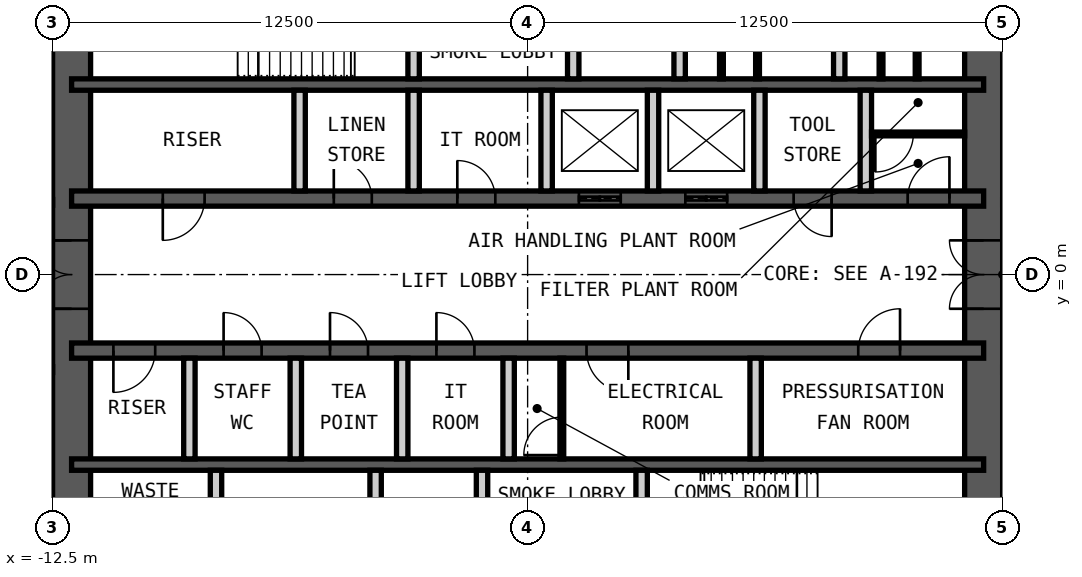
"""IFC4 building model, lengths in metres.
Left out: names, types, materials, properties, quantities, classifications, styles, units other than length and angle.
Written with IfcOpenShell. Run it as: python <this file> out.ifc"""

import sys

from ifc_helpers import new_model, si_unit, direction, frame, frame_2d, origin, place, context, subcontext, project, spatial, rectangle, extrude, element, fill, save


model = new_model("IFC4")
c1 = context("Model", 3, precision=1e-05, world=origin(), true_north=direction((0.0, 1.0)))
c2 = subcontext(c1, "Body", "Model", "MODEL_VIEW")
j1 = project(units=[si_unit("LENGTHUNIT", "METRE"), si_unit("PLANEANGLEUNIT", "RADIAN")], contexts=[c1])
p1 = place(None, origin())
s1 = spatial("IfcSite", under=j1, at=p1, CompositionType="ELEMENT")
p2 = place(p1, origin())
s2 = spatial("IfcBuilding", under=s1, at=p2, CompositionType="ELEMENT")
p3 = place(p2, frame((0.0, 0.0, 274.6)))
s3 = spatial("IfcBuildingStorey", under=s2, at=p3, CompositionType="ELEMENT", Elevation=274.6)
p4 = place(p3, frame((12.0, -9.0, 0.0), z_axis=(0.0, 0.0, 1.0), x_axis=(0.0, 1.0, 0.0)))
e1 = element("IfcWall", 1, at=p4, inside=s3, PredefinedType="SHEAR", context=c2, shape_type="SweptSolid", body=[
    extrude(rectangle(XDim=18.0, YDim=1.0, at=frame_2d((9.0, 0.0))), origin(), (0.0, 0.0, 1.0), 4.2),
])
p5 = place(p4, frame((8.1, 0.0, 0.0)))
e2 = element("IfcOpeningElement", 2, at=p5, cuts=e1, PredefinedType="OPENING", context=c2, shape_type="SweptSolid", body=[
    extrude(rectangle(XDim=1.8, YDim=2.1, at=frame_2d((0.9, 1.05))), frame((0.0, 0.51, 0.0), z_axis=(0.0, -1.0, 0.0), x_axis=(1.0, 0.0, 0.0)), (0.0, 0.0, 1.0), 1.02),
])
p6 = place(p3, frame((-12.0, -9.0, 0.0), z_axis=(0.0, 0.0, 1.0), x_axis=(0.0, 1.0, 0.0)))
e3 = element("IfcWall", 3, at=p6, inside=s3, PredefinedType="SHEAR", context=c2, shape_type="SweptSolid", body=[
    extrude(rectangle(XDim=18.0, YDim=1.0, at=frame_2d((9.0, 0.0))), origin(), (0.0, 0.0, 1.0), 4.2),
])
p7 = place(p6, frame((8.1, 0.0, 0.0)))
e4 = element("IfcOpeningElement", 4, at=p7, cuts=e3, PredefinedType="OPENING", context=c2, shape_type="SweptSolid", body=[
    extrude(rectangle(XDim=1.8, YDim=2.1, at=frame_2d((0.9, 1.05))), frame((0.0, 0.51, 0.0), z_axis=(0.0, -1.0, 0.0), x_axis=(1.0, 0.0, 0.0)), (0.0, 0.0, 1.0), 1.02),
])
p8 = place(p3, frame((-12.0, 5.0, 0.0), z_axis=(0.0, 0.0, 1.0), x_axis=(1.0, 0.0, 0.0)))
e5 = element("IfcWall", 5, at=p8, inside=s3, PredefinedType="SHEAR", context=c2, shape_type="SweptSolid", body=[
    extrude(rectangle(XDim=24.0, YDim=0.3, at=frame_2d((12.0, 0.0))), origin(), (0.0, 0.0, 1.0), 4.2),
])
p9 = place(p3, frame((-12.0, 2.0, 0.0), z_axis=(0.0, 0.0, 1.0), x_axis=(1.0, 0.0, 0.0)))
e6 = element("IfcWall", 6, at=p9, inside=s3, PredefinedType="SHEAR", context=c2, shape_type="SweptSolid", body=[
    extrude(rectangle(XDim=24.0, YDim=0.4, at=frame_2d((12.0, 0.0))), origin(), (0.0, 0.0, 1.0), 4.2),
])
p10 = place(p9, frame((2.4, 0.0, 0.0)))
e7 = element("IfcOpeningElement", 7, at=p10, cuts=e6, PredefinedType="OPENING", context=c2, shape_type="SweptSolid", body=[
    extrude(rectangle(XDim=1.1, YDim=2.1, at=frame_2d((0.55, 1.05))), frame((0.0, 0.21, 0.0), z_axis=(0.0, -1.0, 0.0), x_axis=(1.0, 0.0, 0.0)), (0.0, 0.0, 1.0), 0.42),
])
p11 = place(p9, frame((22.0, 0.0, 0.0)))
e8 = element("IfcOpeningElement", 8, at=p11, cuts=e6, PredefinedType="OPENING", context=c2, shape_type="SweptSolid", body=[
    extrude(rectangle(XDim=1.1, YDim=2.1, at=frame_2d((0.55, 1.05))), frame((0.0, 0.21, 0.0), z_axis=(0.0, -1.0, 0.0), x_axis=(1.0, 0.0, 0.0)), (0.0, 0.0, 1.0), 0.42),
])
p12 = place(p9, frame((10.15, 0.0, 0.0)))
e9 = element("IfcOpeningElement", 9, at=p12, cuts=e6, PredefinedType="OPENING", context=c2, shape_type="SweptSolid", body=[
    extrude(rectangle(XDim=1.0, YDim=2.1, at=frame_2d((0.5, 1.05))), frame((0.0, 0.21, 0.0), z_axis=(0.0, -1.0, 0.0), x_axis=(1.0, 0.0, 0.0)), (0.0, 0.0, 1.0), 0.42),
])
p13 = place(p9, frame((6.9, 0.0, 0.0)))
e10 = element("IfcOpeningElement", 10, at=p13, cuts=e6, PredefinedType="OPENING", context=c2, shape_type="SweptSolid", body=[
    extrude(rectangle(XDim=1.0, YDim=2.1, at=frame_2d((0.5, 1.05))), frame((0.0, 0.21, 0.0), z_axis=(0.0, -1.0, 0.0), x_axis=(1.0, 0.0, 0.0)), (0.0, 0.0, 1.0), 0.42),
])
p14 = place(p9, frame((13.35, 0.0, 0.0)))
e11 = element("IfcOpeningElement", 11, at=p14, cuts=e6, PredefinedType="OPENING", context=c2, shape_type="SweptSolid", body=[
    extrude(rectangle(XDim=1.1, YDim=2.4, at=frame_2d((0.55, 1.2))), frame((0.0, 0.21, 0.0), z_axis=(0.0, -1.0, 0.0), x_axis=(1.0, 0.0, 0.0)), (0.0, 0.0, 1.0), 0.42),
])
p15 = place(p9, frame((16.15, 0.0, 0.0)))
e12 = element("IfcOpeningElement", 12, at=p15, cuts=e6, PredefinedType="OPENING", context=c2, shape_type="SweptSolid", body=[
    extrude(rectangle(XDim=1.1, YDim=2.4, at=frame_2d((0.55, 1.2))), frame((0.0, 0.21, 0.0), z_axis=(0.0, -1.0, 0.0), x_axis=(1.0, 0.0, 0.0)), (0.0, 0.0, 1.0), 0.42),
])
p16 = place(p9, frame((19.0, 0.0, 0.0)))
e13 = element("IfcOpeningElement", 13, at=p16, cuts=e6, PredefinedType="OPENING", context=c2, shape_type="SweptSolid", body=[
    extrude(rectangle(XDim=1.0, YDim=2.1, at=frame_2d((0.5, 1.05))), frame((0.0, 0.21, 0.0), z_axis=(0.0, -1.0, 0.0), x_axis=(1.0, 0.0, 0.0)), (0.0, 0.0, 1.0), 0.42),
])
p17 = place(p3, frame((-12.0, -2.0, 0.0), z_axis=(0.0, 0.0, 1.0), x_axis=(1.0, 0.0, 0.0)))
e14 = element("IfcWall", 14, at=p17, inside=s3, PredefinedType="SHEAR", context=c2, shape_type="SweptSolid", body=[
    extrude(rectangle(XDim=24.0, YDim=0.4, at=frame_2d((12.0, 0.0))), origin(), (0.0, 0.0, 1.0), 4.2),
])
p18 = place(p17, frame((1.1, 0.0, 0.0)))
e15 = element("IfcOpeningElement", 15, at=p18, cuts=e14, PredefinedType="OPENING", context=c2, shape_type="SweptSolid", body=[
    extrude(rectangle(XDim=1.1, YDim=2.1, at=frame_2d((0.55, 1.05))), frame((0.0, 0.21, 0.0), z_axis=(0.0, -1.0, 0.0), x_axis=(1.0, 0.0, 0.0)), (0.0, 0.0, 1.0), 0.42),
])
p19 = place(p17, frame((13.55, 0.0, 0.0)))
e16 = element("IfcOpeningElement", 16, at=p19, cuts=e14, PredefinedType="OPENING", context=c2, shape_type="SweptSolid", body=[
    extrude(rectangle(XDim=1.1, YDim=2.1, at=frame_2d((0.55, 1.05))), frame((0.0, 0.21, 0.0), z_axis=(0.0, -1.0, 0.0), x_axis=(1.0, 0.0, 0.0)), (0.0, 0.0, 1.0), 0.42),
])
p20 = place(p17, frame((20.7, 0.0, 0.0)))
e17 = element("IfcOpeningElement", 17, at=p20, cuts=e14, PredefinedType="OPENING", context=c2, shape_type="SweptSolid", body=[
    extrude(rectangle(XDim=1.1, YDim=2.1, at=frame_2d((0.55, 1.05))), frame((0.0, 0.21, 0.0), z_axis=(0.0, -1.0, 0.0), x_axis=(1.0, 0.0, 0.0)), (0.0, 0.0, 1.0), 0.42),
])
p21 = place(p17, frame((4.0, 0.0, 0.0)))
e18 = element("IfcOpeningElement", 18, at=p21, cuts=e14, PredefinedType="OPENING", context=c2, shape_type="SweptSolid", body=[
    extrude(rectangle(XDim=1.0, YDim=2.1, at=frame_2d((0.5, 1.05))), frame((0.0, 0.21, 0.0), z_axis=(0.0, -1.0, 0.0), x_axis=(1.0, 0.0, 0.0)), (0.0, 0.0, 1.0), 0.42),
])
p22 = place(p17, frame((6.8, 0.0, 0.0)))
e19 = element("IfcOpeningElement", 19, at=p22, cuts=e14, PredefinedType="OPENING", context=c2, shape_type="SweptSolid", body=[
    extrude(rectangle(XDim=1.0, YDim=2.1, at=frame_2d((0.5, 1.05))), frame((0.0, 0.21, 0.0), z_axis=(0.0, -1.0, 0.0), x_axis=(1.0, 0.0, 0.0)), (0.0, 0.0, 1.0), 0.42),
])
p23 = place(p17, frame((9.6, 0.0, 0.0)))
e20 = element("IfcOpeningElement", 20, at=p23, cuts=e14, PredefinedType="OPENING", context=c2, shape_type="SweptSolid", body=[
    extrude(rectangle(XDim=1.0, YDim=2.1, at=frame_2d((0.5, 1.05))), frame((0.0, 0.21, 0.0), z_axis=(0.0, -1.0, 0.0), x_axis=(1.0, 0.0, 0.0)), (0.0, 0.0, 1.0), 0.42),
])
p24 = place(p3, frame((-12.0, -5.0, 0.0), z_axis=(0.0, 0.0, 1.0), x_axis=(1.0, 0.0, 0.0)))
e21 = element("IfcWall", 21, at=p24, inside=s3, PredefinedType="SHEAR", context=c2, shape_type="SweptSolid", body=[
    extrude(rectangle(XDim=24.0, YDim=0.3, at=frame_2d((12.0, 0.0))), origin(), (0.0, 0.0, 1.0), 4.2),
])
p25 = place(p3, frame((-3.0, 5.15, 0.0), z_axis=(0.0, 0.0, 1.0), x_axis=(0.0, 1.0, 0.0)))
e22 = element("IfcWall", 22, at=p25, inside=s3, PredefinedType="PARTITIONING", context=c2, shape_type="SweptSolid", body=[
    extrude(rectangle(XDim=3.85, YDim=0.3, at=frame_2d((1.925, 0.0))), origin(), (0.0, 0.0, 1.0), 3.98),
])
p26 = place(p25, frame((1.425, 0.0, 0.0)))
e23 = element("IfcOpeningElement", 23, at=p26, cuts=e22, PredefinedType="OPENING", context=c2, shape_type="SweptSolid", body=[
    extrude(rectangle(XDim=1.0, YDim=2.1, at=frame_2d((0.5, 1.05))), frame((0.0, 0.16, 0.0), z_axis=(0.0, -1.0, 0.0), x_axis=(1.0, 0.0, 0.0)), (0.0, 0.0, 1.0), 0.32),
])
p27 = place(p3, frame((1.2, 5.15, 0.0), z_axis=(0.0, 0.0, 1.0), x_axis=(0.0, 1.0, 0.0)))
e24 = element("IfcWall", 24, at=p27, inside=s3, PredefinedType="PARTITIONING", context=c2, shape_type="SweptSolid", body=[
    extrude(rectangle(XDim=3.85, YDim=0.3, at=frame_2d((1.925, 0.0))), origin(), (0.0, 0.0, 1.0), 3.98),
])
p28 = place(p27, frame((1.375, 0.0, 0.0)))
e25 = element("IfcOpeningElement", 25, at=p28, cuts=e24, PredefinedType="OPENING", context=c2, shape_type="SweptSolid", body=[
    extrude(rectangle(XDim=1.1, YDim=2.4, at=frame_2d((0.55, 1.2))), frame((0.0, 0.16, 0.0), z_axis=(0.0, -1.0, 0.0), x_axis=(1.0, 0.0, 0.0)), (0.0, 0.0, 1.0), 0.32),
])
for number, where, z_axis, x_axis in (
    (26, (4.0, 5.15, 0.0), (0.0, 0.0, 1.0), (0.0, 1.0, 0.0)),
    (27, (8.2, 5.15, 0.0), (0.0, 0.0, 1.0), (0.0, 1.0, 0.0)),
):
    element("IfcWall", number, at=place(p3, frame(where, z_axis=z_axis, x_axis=x_axis)), inside=s3, PredefinedType="PARTITIONING", context=c2, shape_type="SweptSolid", body=[
        extrude(rectangle(XDim=3.85, YDim=0.3, at=frame_2d((1.925, 0.0))), origin(), (0.0, 0.0, 1.0), 3.98),
    ])
for number, where, z_axis, x_axis in (
    (28, (-6.0, 2.2, 0.0), (0.0, 0.0, 1.0), (0.0, 1.0, 0.0)),
    (29, (-3.0, 2.2, 0.0), (0.0, 0.0, 1.0), (0.0, 1.0, 0.0)),
    (30, (0.5, 2.2, 0.0), (0.0, 0.0, 1.0), (0.0, 1.0, 0.0)),
    (31, (3.3, 2.2, 0.0), (0.0, 0.0, 1.0), (0.0, 1.0, 0.0)),
    (32, (6.1, 2.2, 0.0), (0.0, 0.0, 1.0), (0.0, 1.0, 0.0)),
    (33, (8.9, 2.2, 0.0), (0.0, 0.0, 1.0), (0.0, 1.0, 0.0)),
    (34, (-8.9, -4.85, 0.0), (0.0, 0.0, 1.0), (0.0, 1.0, 0.0)),
    (35, (-6.1, -4.85, 0.0), (0.0, 0.0, 1.0), (0.0, 1.0, 0.0)),
    (36, (-3.3, -4.85, 0.0), (0.0, 0.0, 1.0), (0.0, 1.0, 0.0)),
    (37, (-0.5, -4.85, 0.0), (0.0, 0.0, 1.0), (0.0, 1.0, 0.0)),
    (38, (6.0, -4.85, 0.0), (0.0, 0.0, 1.0), (0.0, 1.0, 0.0)),
):
    element("IfcWall", number, at=place(p3, frame(where, z_axis=z_axis, x_axis=x_axis)), inside=s3, PredefinedType="PARTITIONING", context=c2, shape_type="SweptSolid", body=[
        extrude(rectangle(XDim=2.65, YDim=0.3, at=frame_2d((1.325, 0.0))), origin(), (0.0, 0.0, 1.0), 3.98),
    ])
for number, where, z_axis, x_axis in (
    (39, (-8.2, -9.0, 0.0), (0.0, 0.0, 1.0), (0.0, 1.0, 0.0)),
    (40, (-4.0, -9.0, 0.0), (0.0, 0.0, 1.0), (0.0, 1.0, 0.0)),
):
    element("IfcWall", number, at=place(p3, frame(where, z_axis=z_axis, x_axis=x_axis)), inside=s3, PredefinedType="PARTITIONING", context=c2, shape_type="SweptSolid", body=[
        extrude(rectangle(XDim=3.85, YDim=0.3, at=frame_2d((1.925, 0.0))), origin(), (0.0, 0.0, 1.0), 3.98),
    ])
p29 = place(p3, frame((-1.2, -9.0, 0.0), z_axis=(0.0, 0.0, 1.0), x_axis=(0.0, 1.0, 0.0)))
e41 = element("IfcWall", 41, at=p29, inside=s3, PredefinedType="PARTITIONING", context=c2, shape_type="SweptSolid", body=[
    extrude(rectangle(XDim=3.85, YDim=0.3, at=frame_2d((1.925, 0.0))), origin(), (0.0, 0.0, 1.0), 3.98),
])
p30 = place(p29, frame((1.375, 0.0, 0.0)))
e42 = element("IfcOpeningElement", 42, at=p30, cuts=e41, PredefinedType="OPENING", context=c2, shape_type="SweptSolid", body=[
    extrude(rectangle(XDim=1.1, YDim=2.4, at=frame_2d((0.55, 1.2))), frame((0.0, 0.16, 0.0), z_axis=(0.0, -1.0, 0.0), x_axis=(1.0, 0.0, 0.0)), (0.0, 0.0, 1.0), 0.32),
])
p31 = place(p3, frame((3.0, -9.0, 0.0), z_axis=(0.0, 0.0, 1.0), x_axis=(0.0, 1.0, 0.0)))
e43 = element("IfcWall", 43, at=p31, inside=s3, PredefinedType="PARTITIONING", context=c2, shape_type="SweptSolid", body=[
    extrude(rectangle(XDim=3.85, YDim=0.3, at=frame_2d((1.925, 0.0))), origin(), (0.0, 0.0, 1.0), 3.98),
])
p32 = place(p31, frame((1.425, 0.0, 0.0)))
e44 = element("IfcOpeningElement", 44, at=p32, cuts=e43, PredefinedType="OPENING", context=c2, shape_type="SweptSolid", body=[
    extrude(rectangle(XDim=1.0, YDim=2.1, at=frame_2d((0.5, 1.05))), frame((0.0, 0.16, 0.0), z_axis=(0.0, -1.0, 0.0), x_axis=(1.0, 0.0, 0.0)), (0.0, 0.0, 1.0), 0.32),
])
p33 = place(p3, frame((0.9, -4.85, 0.0), z_axis=(0.0, 0.0, 1.0), x_axis=(0.0, 1.0, 0.0)))
e45 = element("IfcWall", 45, at=p33, inside=s3, PredefinedType="PARTITIONING", context=c2, shape_type="SweptSolid", body=[
    extrude(rectangle(XDim=2.65, YDim=0.1, at=frame_2d((1.325, 0.0))), origin(), (0.0, 0.0, 1.0), 3.98),
])
p34 = place(p33, frame((0.1, 0.0, 0.0)))
e46 = element("IfcOpeningElement", 46, at=p34, cuts=e45, PredefinedType="OPENING", context=c2, shape_type="SweptSolid", body=[
    extrude(rectangle(XDim=1.0, YDim=2.4, at=frame_2d((0.5, 1.2))), frame((0.0, 0.06, 0.0), z_axis=(0.0, -1.0, 0.0), x_axis=(1.0, 0.0, 0.0)), (0.0, 0.0, 1.0), 0.12),
])
p35 = place(p3, frame((9.05, 3.7, 0.0), z_axis=(0.0, 0.0, 1.0), x_axis=(1.0, 0.0, 0.0)))
e47 = element("IfcWall", 47, at=p35, inside=s3, PredefinedType="PARTITIONING", context=c2, shape_type="SweptSolid", body=[
    extrude(rectangle(XDim=2.45, YDim=0.1, at=frame_2d((1.225, 0.0))), origin(), (0.0, 0.0, 1.0), 3.98),
])
p36 = place(p35, frame((0.1, 0.0, 0.0)))
e48 = element("IfcOpeningElement", 48, at=p36, cuts=e47, PredefinedType="OPENING", context=c2, shape_type="SweptSolid", body=[
    extrude(rectangle(XDim=1.0, YDim=2.4, at=frame_2d((0.5, 1.2))), frame((0.0, 0.06, 0.0), z_axis=(0.0, -1.0, 0.0), x_axis=(1.0, 0.0, 0.0)), (0.0, 0.0, 1.0), 0.12),
])
for number, where, z_axis, x_axis in (
    (49, (5.1, 5.15, 0.0), (0.0, 0.0, 1.0), (0.0, 1.0, 0.0)),
    (50, (6.05, 5.15, 0.0), (0.0, 0.0, 1.0), (0.0, 1.0, 0.0)),
    (51, (9.3, 5.15, 0.0), (0.0, 0.0, 1.0), (0.0, 1.0, 0.0)),
    (52, (10.25, 5.15, 0.0), (0.0, 0.0, 1.0), (0.0, 1.0, 0.0)),
):
    element("IfcWall", number, at=place(p3, frame(where, z_axis=z_axis, x_axis=x_axis)), inside=s3, PredefinedType="PARTITIONING", context=c2, shape_type="SweptSolid", body=[
        extrude(rectangle(XDim=1.5, YDim=0.1, at=frame_2d((0.75, 0.0))), origin(), (0.0, 0.0, 1.0), 2.1),
    ])
p37 = place(p10, origin())
e53 = element("IfcDoor", 53, at=p37, inside=s3, OperationType="SINGLE_SWING_LEFT", PredefinedType="DOOR", context=c2, shape_type="SweptSolid", body=[
    extrude(rectangle(XDim=1.1, YDim=2.1, at=frame_2d((0.55, 1.05))), frame((0.0, 0.025, 0.0), z_axis=(0.0, -1.0, 0.0), x_axis=(1.0, 0.0, 0.0)), (0.0, 0.0, 1.0), 0.05),
])
fill(e7, e53)
p38 = place(p18, origin())
e54 = element("IfcDoor", 54, at=p38, inside=s3, OperationType="SINGLE_SWING_LEFT", PredefinedType="DOOR", context=c2, shape_type="SweptSolid", body=[
    extrude(rectangle(XDim=1.1, YDim=2.1, at=frame_2d((0.55, 1.05))), frame((0.0, 0.025, 0.0), z_axis=(0.0, -1.0, 0.0), x_axis=(1.0, 0.0, 0.0)), (0.0, 0.0, 1.0), 0.05),
])
fill(e15, e54)
p39 = place(p11, origin())
e55 = element("IfcDoor", 55, at=p39, inside=s3, OperationType="SINGLE_SWING_LEFT", PredefinedType="DOOR", context=c2, shape_type="SweptSolid", body=[
    extrude(rectangle(XDim=1.1, YDim=2.1, at=frame_2d((0.55, 1.05))), frame((0.0, 0.025, 0.0), z_axis=(0.0, -1.0, 0.0), x_axis=(1.0, 0.0, 0.0)), (0.0, 0.0, 1.0), 0.05),
])
fill(e8, e55)
p40 = place(p12, origin())
e56 = element("IfcDoor", 56, at=p40, inside=s3, OperationType="SINGLE_SWING_RIGHT", PredefinedType="DOOR", context=c2, shape_type="SweptSolid", body=[
    extrude(rectangle(XDim=1.0, YDim=2.1, at=frame_2d((0.5, 1.05))), frame((0.0, 0.025, 0.0), z_axis=(0.0, -1.0, 0.0), x_axis=(1.0, 0.0, 0.0)), (0.0, 0.0, 1.0), 0.05),
])
fill(e9, e56)
p41 = place(p19, origin())
e57 = element("IfcDoor", 57, at=p41, inside=s3, OperationType="SINGLE_SWING_RIGHT", PredefinedType="DOOR", context=c2, shape_type="SweptSolid", body=[
    extrude(rectangle(XDim=1.1, YDim=2.1, at=frame_2d((0.55, 1.05))), frame((0.0, 0.025, 0.0), z_axis=(0.0, -1.0, 0.0), x_axis=(1.0, 0.0, 0.0)), (0.0, 0.0, 1.0), 0.05),
])
fill(e16, e57)
p42 = place(p20, origin())
e58 = element("IfcDoor", 58, at=p42, inside=s3, OperationType="SINGLE_SWING_LEFT", PredefinedType="DOOR", context=c2, shape_type="SweptSolid", body=[
    extrude(rectangle(XDim=1.1, YDim=2.1, at=frame_2d((0.55, 1.05))), frame((0.0, 0.025, 0.0), z_axis=(0.0, -1.0, 0.0), x_axis=(1.0, 0.0, 0.0)), (0.0, 0.0, 1.0), 0.05),
])
fill(e17, e58)
p43 = place(p5, origin())
e59 = element("IfcDoor", 59, at=p43, inside=s3, OperationType="DOUBLE_DOOR_DOUBLE_SWING", PredefinedType="DOOR", context=c2, shape_type="SweptSolid", body=[
    extrude(rectangle(XDim=1.8, YDim=2.1, at=frame_2d((0.9, 1.05))), frame((0.0, 0.025, 0.0), z_axis=(0.0, -1.0, 0.0), x_axis=(1.0, 0.0, 0.0)), (0.0, 0.0, 1.0), 0.05),
])
fill(e2, e59)
p44 = place(p7, origin())
e60 = element("IfcDoor", 60, at=p44, inside=s3, OperationType="DOUBLE_DOOR_DOUBLE_SWING", PredefinedType="DOOR", context=c2, shape_type="SweptSolid", body=[
    extrude(rectangle(XDim=1.8, YDim=2.1, at=frame_2d((0.9, 1.05))), frame((0.0, 0.025, 0.0), z_axis=(0.0, -1.0, 0.0), x_axis=(1.0, 0.0, 0.0)), (0.0, 0.0, 1.0), 0.05),
])
fill(e4, e60)
p45 = place(p13, origin())
e61 = element("IfcDoor", 61, at=p45, inside=s3, OperationType="SINGLE_SWING_RIGHT", PredefinedType="DOOR", context=c2, shape_type="SweptSolid", body=[
    extrude(rectangle(XDim=1.0, YDim=2.1, at=frame_2d((0.5, 1.05))), frame((0.0, 0.025, 0.0), z_axis=(0.0, -1.0, 0.0), x_axis=(1.0, 0.0, 0.0)), (0.0, 0.0, 1.0), 0.05),
])
fill(e10, e61)
p46 = place(p14, origin())
e62 = element("IfcDoor", 62, at=p46, inside=s3, OperationType="DOUBLE_DOOR_SLIDING", PredefinedType="DOOR", context=c2, shape_type="SweptSolid", body=[
    extrude(rectangle(XDim=1.1, YDim=2.4, at=frame_2d((0.55, 1.2))), frame((0.0, 0.025, 0.0), z_axis=(0.0, -1.0, 0.0), x_axis=(1.0, 0.0, 0.0)), (0.0, 0.0, 1.0), 0.05),
])
fill(e11, e62)
p47 = place(p15, origin())
e63 = element("IfcDoor", 63, at=p47, inside=s3, OperationType="DOUBLE_DOOR_SLIDING", PredefinedType="DOOR", context=c2, shape_type="SweptSolid", body=[
    extrude(rectangle(XDim=1.1, YDim=2.4, at=frame_2d((0.55, 1.2))), frame((0.0, 0.025, 0.0), z_axis=(0.0, -1.0, 0.0), x_axis=(1.0, 0.0, 0.0)), (0.0, 0.0, 1.0), 0.05),
])
fill(e12, e63)
p48 = place(p16, origin())
e64 = element("IfcDoor", 64, at=p48, inside=s3, OperationType="SINGLE_SWING_RIGHT", PredefinedType="DOOR", context=c2, shape_type="SweptSolid", body=[
    extrude(rectangle(XDim=1.0, YDim=2.1, at=frame_2d((0.5, 1.05))), frame((0.0, 0.025, 0.0), z_axis=(0.0, -1.0, 0.0), x_axis=(1.0, 0.0, 0.0)), (0.0, 0.0, 1.0), 0.05),
])
fill(e13, e64)
p49 = place(p21, origin())
e65 = element("IfcDoor", 65, at=p49, inside=s3, OperationType="SINGLE_SWING_RIGHT", PredefinedType="DOOR", context=c2, shape_type="SweptSolid", body=[
    extrude(rectangle(XDim=1.0, YDim=2.1, at=frame_2d((0.5, 1.05))), frame((0.0, 0.025, 0.0), z_axis=(0.0, -1.0, 0.0), x_axis=(1.0, 0.0, 0.0)), (0.0, 0.0, 1.0), 0.05),
])
fill(e18, e65)
p50 = place(p22, origin())
e66 = element("IfcDoor", 66, at=p50, inside=s3, OperationType="SINGLE_SWING_RIGHT", PredefinedType="DOOR", context=c2, shape_type="SweptSolid", body=[
    extrude(rectangle(XDim=1.0, YDim=2.1, at=frame_2d((0.5, 1.05))), frame((0.0, 0.025, 0.0), z_axis=(0.0, -1.0, 0.0), x_axis=(1.0, 0.0, 0.0)), (0.0, 0.0, 1.0), 0.05),
])
fill(e19, e66)
p51 = place(p23, origin())
e67 = element("IfcDoor", 67, at=p51, inside=s3, OperationType="SINGLE_SWING_RIGHT", PredefinedType="DOOR", context=c2, shape_type="SweptSolid", body=[
    extrude(rectangle(XDim=1.0, YDim=2.1, at=frame_2d((0.5, 1.05))), frame((0.0, 0.025, 0.0), z_axis=(0.0, -1.0, 0.0), x_axis=(1.0, 0.0, 0.0)), (0.0, 0.0, 1.0), 0.05),
])
fill(e20, e67)
p52 = place(p34, origin())
e68 = element("IfcDoor", 68, at=p52, inside=s3, OperationType="SINGLE_SWING_RIGHT", PredefinedType="DOOR", context=c2, shape_type="SweptSolid", body=[
    extrude(rectangle(XDim=1.0, YDim=2.4, at=frame_2d((0.5, 1.2))), frame((0.0, 0.025, 0.0), z_axis=(0.0, -1.0, 0.0), x_axis=(1.0, 0.0, 0.0)), (0.0, 0.0, 1.0), 0.05),
])
fill(e46, e68)
p53 = place(p36, origin())
e69 = element("IfcDoor", 69, at=p53, inside=s3, OperationType="SINGLE_SWING_LEFT", PredefinedType="DOOR", context=c2, shape_type="SweptSolid", body=[
    extrude(rectangle(XDim=1.0, YDim=2.4, at=frame_2d((0.5, 1.2))), frame((0.0, 0.025, 0.0), z_axis=(0.0, -1.0, 0.0), x_axis=(1.0, 0.0, 0.0)), (0.0, 0.0, 1.0), 0.05),
])
fill(e48, e69)
save(model, sys.argv[1])
